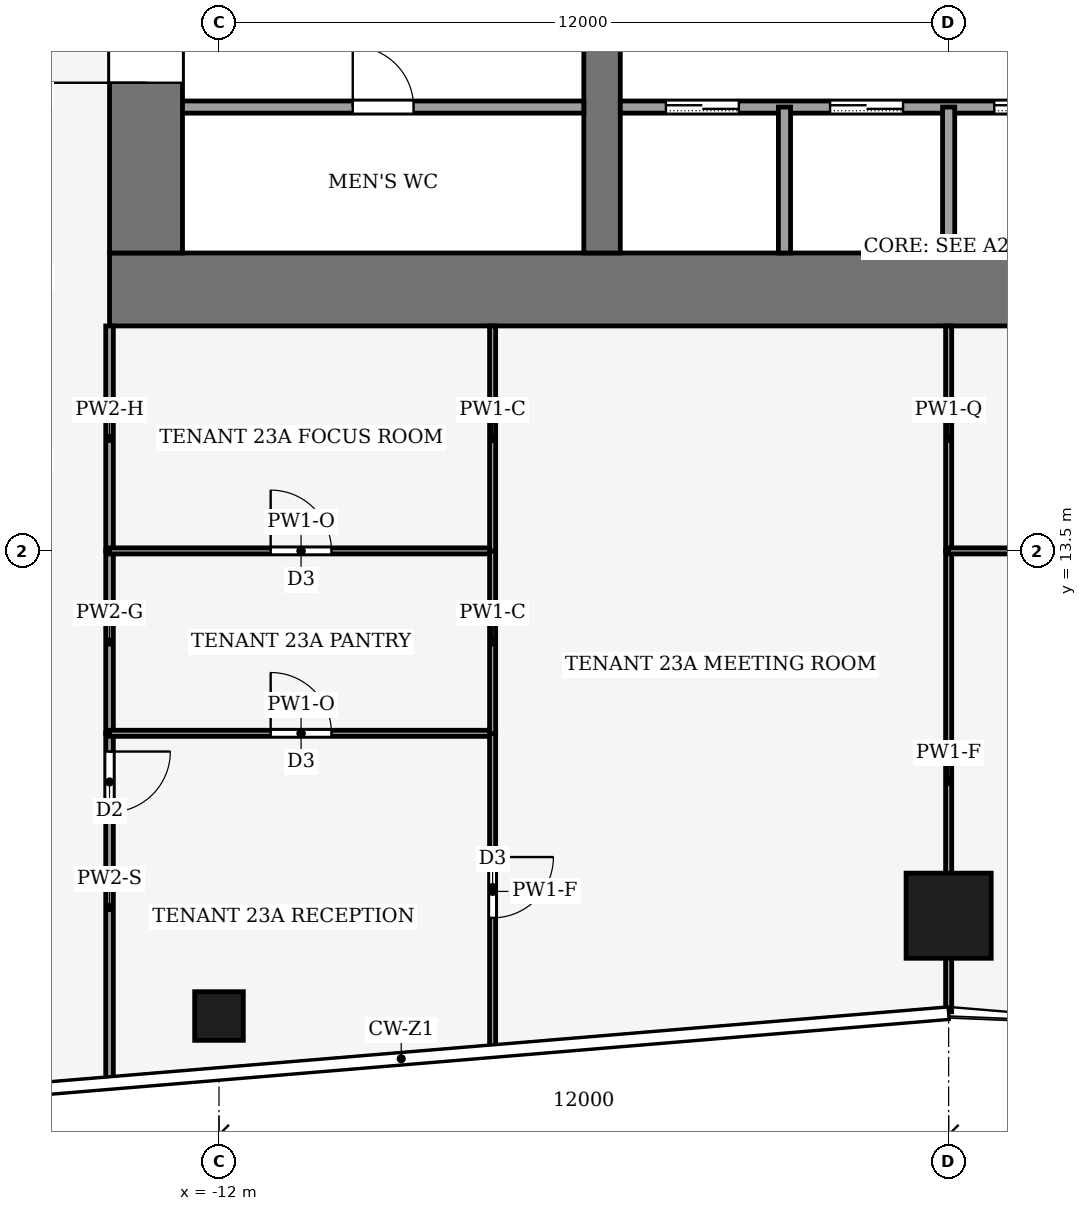
"""IFC4 building model, lengths in metres.
Left out: names, types, materials, properties, quantities, classifications, styles, units other than length and angle.
Written with IfcOpenShell. Run it as: python <this file> out.ifc"""

import sys

from ifc_helpers import new_model, si_unit, direction, frame, frame_2d, origin, origin_2d, place, context, subcontext, project, spatial, rectangle, hollow_rectangle, extrude, element, fill, save


model = new_model("IFC4")
c1 = context("Model", 3, precision=1e-05, world=origin(), true_north=direction((0.0, 1.0)))
c2 = subcontext(c1, "Body", "Model", "MODEL_VIEW")
j1 = project(units=[si_unit("LENGTHUNIT", "METRE"), si_unit("PLANEANGLEUNIT", "RADIAN")], contexts=[c1])
p1 = place(None, origin())
s1 = spatial("IfcSite", under=j1, at=p1, CompositionType="ELEMENT")
p2 = place(p1, origin())
s2 = spatial("IfcBuilding", under=s1, at=p2, CompositionType="ELEMENT")
p3 = place(p2, frame((0.0, 0.0, 102.0)))
s3 = spatial("IfcBuildingStorey", under=s2, at=p3, CompositionType="ELEMENT", Elevation=102.0)
p4 = place(p3, frame((-13.8, 17.8, -0.13), z_axis=(0.0, 0.0, 1.0), x_axis=(1.0, 0.0, 0.0)))
e1 = element("IfcWall", 1, at=p4, inside=s3, PredefinedType="SHEAR", context=c2, shape_type="SweptSolid", body=[
    extrude(rectangle(XDim=27.6, YDim=1.2, at=frame_2d((13.8, 0.0))), origin(), (0.0, 0.0, 1.0), 4.0),
])
p5 = place(p3, frame((-13.2, 18.4, -0.13), z_axis=(0.0, 0.0, 1.0), x_axis=(0.0, 1.0, 0.0)))
e2 = element("IfcWall", 2, at=p5, inside=s3, PredefinedType="SHEAR", context=c2, shape_type="SweptSolid", body=[
    extrude(rectangle(XDim=19.2, YDim=1.2, at=frame_2d((9.6, 0.0))), origin(), (0.0, 0.0, 1.0), 4.0),
])
p6 = place(p5, frame((2.8, 0.0, 0.13)))
e3 = element("IfcOpeningElement", 3, at=p6, cuts=e2, PredefinedType="OPENING", context=c2, shape_type="SweptSolid", body=[
    extrude(rectangle(XDim=2.4, YDim=2.4, at=frame_2d((1.2, 1.2))), frame((0.0, 0.61, 0.0), z_axis=(0.0, -1.0, 0.0), x_axis=(1.0, 0.0, 0.0)), (0.0, 0.0, 1.0), 1.22),
])
p7 = place(p5, frame((13.4, 0.0, 0.13)))
e4 = element("IfcOpeningElement", 4, at=p7, cuts=e2, PredefinedType="OPENING", context=c2, shape_type="SweptSolid", body=[
    extrude(rectangle(XDim=1.4, YDim=2.2, at=frame_2d((0.7, 1.1))), frame((0.0, 0.61, 0.0), z_axis=(0.0, -1.0, 0.0), x_axis=(1.0, 0.0, 0.0)), (0.0, 0.0, 1.0), 1.22),
])
p8 = place(p3, frame((-5.7, 18.4, -0.13), z_axis=(0.0, 0.0, 1.0), x_axis=(0.0, 1.0, 0.0)))
e5 = element("IfcWall", 5, at=p8, inside=s3, PredefinedType="SHEAR", context=c2, shape_type="SweptSolid", body=[
    extrude(rectangle(XDim=19.2, YDim=0.6, at=frame_2d((9.6, 0.0))), origin(), (0.0, 0.0, 1.0), 4.0),
])
p9 = place(p8, frame((8.35, 0.0, 0.13)))
e6 = element("IfcOpeningElement", 6, at=p9, cuts=e5, PredefinedType="OPENING", context=c2, shape_type="SweptSolid", body=[
    extrude(rectangle(XDim=0.9, YDim=2.1, at=frame_2d((0.45, 1.05))), frame((0.0, 0.31, 0.0), z_axis=(0.0, -1.0, 0.0), x_axis=(1.0, 0.0, 0.0)), (0.0, 0.0, 1.0), 0.62),
])
p10 = place(p3, frame((0.0, 7.5, 0.0), z_axis=(0.0, 0.0, 1.0), x_axis=(1.0, 0.0, 0.0)))
e7 = element("IfcColumn", 7, at=p10, inside=s3, PredefinedType="COLUMN", context=c2, shape_type="SweptSolid", body=[
    extrude(hollow_rectangle(XDim=1.4, YDim=1.4, WallThickness=0.08, at=origin_2d()), origin(), (0.0, 0.0, 1.0), 4.0),
])
p11 = place(p3, frame((-12.0, 5.85, 0.0), z_axis=(0.0, 0.0, 1.0), x_axis=(1.0, 0.0, 0.0)))
e8 = element("IfcColumn", 8, at=p11, inside=s3, PredefinedType="COLUMN", context=c2, shape_type="SweptSolid", body=[
    extrude(hollow_rectangle(XDim=0.8, YDim=0.8, WallThickness=0.04, at=origin_2d()), origin(), (0.0, 0.0, 1.0), 4.0),
])
p12 = place(p3, frame((-12.6, 20.8, 0.0), z_axis=(0.0, 0.0, 1.0), x_axis=(1.0, 0.0, 0.0)))
e9 = element("IfcWall", 9, at=p12, inside=s3, PredefinedType="PARTITIONING", context=c2, shape_type="SweptSolid", body=[
    extrude(rectangle(XDim=6.6, YDim=0.2, at=frame_2d((3.3, 0.0))), origin(), (0.0, 0.0, 1.0), 3.87),
])
p13 = place(p12, frame((2.8, 0.0, 0.0)))
e10 = element("IfcOpeningElement", 10, at=p13, cuts=e9, PredefinedType="OPENING", context=c2, shape_type="SweptSolid", body=[
    extrude(rectangle(XDim=1.0, YDim=2.1, at=frame_2d((0.5, 1.05))), frame((0.0, 0.11, 0.0), z_axis=(0.0, -1.0, 0.0), x_axis=(1.0, 0.0, 0.0)), (0.0, 0.0, 1.0), 0.22),
])
p14 = place(p3, frame((-5.4, 20.8, 0.0), z_axis=(0.0, 0.0, 1.0), x_axis=(1.0, 0.0, 0.0)))
e11 = element("IfcWall", 11, at=p14, inside=s3, PredefinedType="PARTITIONING", context=c2, shape_type="SweptSolid", body=[
    extrude(rectangle(XDim=10.8, YDim=0.2, at=frame_2d((5.4, 0.0))), origin(), (0.0, 0.0, 1.0), 3.87),
])
p15 = place(p14, frame((0.75, 0.0, 0.0)))
e12 = element("IfcOpeningElement", 12, at=p15, cuts=e11, PredefinedType="OPENING", context=c2, shape_type="SweptSolid", body=[
    extrude(rectangle(XDim=1.2, YDim=2.2, at=frame_2d((0.6, 1.1))), frame((0.0, 0.11, 0.0), z_axis=(0.0, -1.0, 0.0), x_axis=(1.0, 0.0, 0.0)), (0.0, 0.0, 1.0), 0.22),
])
p16 = place(p14, frame((3.45, 0.0, 0.0)))
e13 = element("IfcOpeningElement", 13, at=p16, cuts=e11, PredefinedType="OPENING", context=c2, shape_type="SweptSolid", body=[
    extrude(rectangle(XDim=1.2, YDim=2.2, at=frame_2d((0.6, 1.1))), frame((0.0, 0.11, 0.0), z_axis=(0.0, -1.0, 0.0), x_axis=(1.0, 0.0, 0.0)), (0.0, 0.0, 1.0), 0.22),
])
p17 = place(p14, frame((6.15, 0.0, 0.0)))
e14 = element("IfcOpeningElement", 14, at=p17, cuts=e11, PredefinedType="OPENING", context=c2, shape_type="SweptSolid", body=[
    extrude(rectangle(XDim=1.2, YDim=2.2, at=frame_2d((0.6, 1.1))), frame((0.0, 0.11, 0.0), z_axis=(0.0, -1.0, 0.0), x_axis=(1.0, 0.0, 0.0)), (0.0, 0.0, 1.0), 0.22),
])
p18 = place(p14, frame((8.85, 0.0, 0.0)))
e15 = element("IfcOpeningElement", 15, at=p18, cuts=e11, PredefinedType="OPENING", context=c2, shape_type="SweptSolid", body=[
    extrude(rectangle(XDim=1.2, YDim=2.2, at=frame_2d((0.6, 1.1))), frame((0.0, 0.11, 0.0), z_axis=(0.0, -1.0, 0.0), x_axis=(1.0, 0.0, 0.0)), (0.0, 0.0, 1.0), 0.22),
])
for number, where, z_axis, x_axis in (
    (16, (-2.7, 18.4, 0.0), (0.0, 0.0, 1.0), (0.0, 1.0, 0.0)),
    (17, (0.0, 18.4, 0.0), (0.0, 0.0, 1.0), (0.0, 1.0, 0.0)),
):
    element("IfcWall", number, at=place(p3, frame(where, z_axis=z_axis, x_axis=x_axis)), inside=s3, PredefinedType="PARTITIONING", context=c2, shape_type="SweptSolid", body=[
        extrude(rectangle(XDim=2.4, YDim=0.2, at=frame_2d((1.2, 0.0))), origin(), (0.0, 0.0, 1.0), 3.87),
    ])
p19 = place(p3, frame((-13.8, 10.5, 0.0), z_axis=(0.0, 0.0, 1.0), x_axis=(0.0, -1.0, 0.0)))
e18 = element("IfcWall", 18, at=p19, inside=s3, PredefinedType="PARTITIONING", context=c2, shape_type="SweptSolid", body=[
    extrude(rectangle(XDim=5.73, YDim=0.125, at=frame_2d((2.865, 0.0))), origin(), (0.0, 0.0, 1.0), 3.04),
])
p20 = place(p19, frame((0.3, 0.0, 0.0)))
e19 = element("IfcOpeningElement", 19, at=p20, cuts=e18, PredefinedType="OPENING", context=c2, shape_type="SweptSolid", body=[
    extrude(rectangle(XDim=1.0, YDim=2.1, at=frame_2d((0.5, 1.05))), frame((0.0, 0.073, 0.0), z_axis=(0.0, -1.0, 0.0), x_axis=(1.0, 0.0, 0.0)), (0.0, 0.0, 1.0), 0.145),
])
p21 = place(p3, frame((-13.8, 10.5, 0.0), z_axis=(0.0, 0.0, 1.0), x_axis=(0.0, 1.0, 0.0)))
e20 = element("IfcWall", 20, at=p21, inside=s3, PredefinedType="PARTITIONING", context=c2, shape_type="SweptSolid", body=[
    extrude(rectangle(XDim=3.0, YDim=0.125, at=frame_2d((1.5, 0.0))), origin(), (0.0, 0.0, 1.0), 3.87),
])
p22 = place(p3, frame((-13.8, 13.5, 0.0), z_axis=(0.0, 0.0, 1.0), x_axis=(0.0, 1.0, 0.0)))
e21 = element("IfcWall", 21, at=p22, inside=s3, PredefinedType="PARTITIONING", context=c2, shape_type="SweptSolid", body=[
    extrude(rectangle(XDim=3.7, YDim=0.125, at=frame_2d((1.85, 0.0))), origin(), (0.0, 0.0, 1.0), 3.14),
])
p23 = place(p3, frame((-13.8, 10.5, 0.0), z_axis=(0.0, 0.0, 1.0), x_axis=(1.0, 0.0, 0.0)))
e22 = element("IfcWall", 22, at=p23, inside=s3, PredefinedType="PARTITIONING", context=c2, shape_type="SweptSolid", body=[
    extrude(rectangle(XDim=6.3, YDim=0.1, at=frame_2d((3.15, 0.0))), origin(), (0.0, 0.0, 1.0), 3.39),
])
p24 = place(p23, frame((2.65, 0.0, 0.0)))
e23 = element("IfcOpeningElement", 23, at=p24, cuts=e22, PredefinedType="OPENING", context=c2, shape_type="SweptSolid", body=[
    extrude(rectangle(XDim=1.0, YDim=2.1, at=frame_2d((0.5, 1.05))), frame((0.0, 0.06, 0.0), z_axis=(0.0, -1.0, 0.0), x_axis=(1.0, 0.0, 0.0)), (0.0, 0.0, 1.0), 0.12),
])
p25 = place(p3, frame((-7.5, 10.504, 0.0), z_axis=(0.0, 0.0, 1.0), x_axis=(0.0, -1.0, 0.0)))
e24 = element("IfcWall", 24, at=p25, inside=s3, PredefinedType="PARTITIONING", context=c2, shape_type="SweptSolid", body=[
    extrude(rectangle(XDim=5.209, YDim=0.1, at=frame_2d((2.604, 0.0))), origin(), (0.0, 0.0, 1.0), 3.04),
])
p26 = place(p25, frame((2.039, 0.0, 0.0)))
e25 = element("IfcOpeningElement", 25, at=p26, cuts=e24, PredefinedType="OPENING", context=c2, shape_type="SweptSolid", body=[
    extrude(rectangle(XDim=1.0, YDim=2.1, at=frame_2d((0.5, 1.05))), frame((0.0, 0.06, 0.0), z_axis=(0.0, -1.0, 0.0), x_axis=(1.0, 0.0, 0.0)), (0.0, 0.0, 1.0), 0.12),
])
p27 = place(p3, frame((-13.8, 13.5, 0.0), z_axis=(0.0, 0.0, 1.0), x_axis=(1.0, 0.0, 0.0)))
e26 = element("IfcWall", 26, at=p27, inside=s3, PredefinedType="PARTITIONING", context=c2, shape_type="SweptSolid", body=[
    extrude(rectangle(XDim=6.3, YDim=0.1, at=frame_2d((3.15, 0.0))), origin(), (0.0, 0.0, 1.0), 3.39),
])
p28 = place(p27, frame((2.65, 0.0, 0.0)))
e27 = element("IfcOpeningElement", 27, at=p28, cuts=e26, PredefinedType="OPENING", context=c2, shape_type="SweptSolid", body=[
    extrude(rectangle(XDim=1.0, YDim=2.1, at=frame_2d((0.5, 1.05))), frame((0.0, 0.06, 0.0), z_axis=(0.0, -1.0, 0.0), x_axis=(1.0, 0.0, 0.0)), (0.0, 0.0, 1.0), 0.12),
])
p29 = place(p3, frame((-7.5, 10.496, 0.0), z_axis=(0.0, 0.0, 1.0), x_axis=(0.0, 1.0, 0.0)))
e28 = element("IfcWall", 28, at=p29, inside=s3, PredefinedType="PARTITIONING", context=c2, shape_type="SweptSolid", body=[
    extrude(rectangle(XDim=3.008, YDim=0.1, at=frame_2d((1.504, 0.0))), origin(), (0.0, 0.0, 1.0), 3.87),
])
p30 = place(p3, frame((-7.5, 13.496, 0.0), z_axis=(0.0, 0.0, 1.0), x_axis=(0.0, 1.0, 0.0)))
e29 = element("IfcWall", 29, at=p30, inside=s3, PredefinedType="PARTITIONING", context=c2, shape_type="SweptSolid", body=[
    extrude(rectangle(XDim=3.704, YDim=0.1, at=frame_2d((1.852, 0.0))), origin(), (0.0, 0.0, 1.0), 3.87),
])
p31 = place(p3, frame((0.0, 5.92, 0.0), z_axis=(0.0, 0.0, 1.0), x_axis=(0.0, 1.0, 0.0)))
e30 = element("IfcWall", 30, at=p31, inside=s3, PredefinedType="PARTITIONING", context=c2, shape_type="SweptSolid", body=[
    extrude(rectangle(XDim=7.58, YDim=0.1, at=frame_2d((3.79, 0.0))), origin(), (0.0, 0.0, 1.0), 3.04),
])
p32 = place(p3, frame((0.0, 13.5, 0.0), z_axis=(0.0, 0.0, 1.0), x_axis=(0.0, 1.0, 0.0)))
e31 = element("IfcWall", 31, at=p32, inside=s3, PredefinedType="PARTITIONING", context=c2, shape_type="SweptSolid", body=[
    extrude(rectangle(XDim=3.7, YDim=0.1, at=frame_2d((1.85, 0.0))), origin(), (0.0, 0.0, 1.0), 3.48),
])
p33 = place(p3, frame((0.0, 13.5, 0.0), z_axis=(0.0, 0.0, 1.0), x_axis=(1.0, 0.0, 0.0)))
e32 = element("IfcWall", 32, at=p33, inside=s3, PredefinedType="PARTITIONING", context=c2, shape_type="SweptSolid", body=[
    extrude(rectangle(XDim=7.5, YDim=0.1, at=frame_2d((3.75, 0.0))), origin(), (0.0, 0.0, 1.0), 3.44),
])
p34 = place(p33, frame((3.25, 0.0, 0.0)))
e33 = element("IfcOpeningElement", 33, at=p34, cuts=e32, PredefinedType="OPENING", context=c2, shape_type="SweptSolid", body=[
    extrude(rectangle(XDim=1.0, YDim=2.1, at=frame_2d((0.5, 1.05))), frame((0.0, 0.06, 0.0), z_axis=(0.0, -1.0, 0.0), x_axis=(1.0, 0.0, 0.0)), (0.0, 0.0, 1.0), 0.12),
])
p35 = place(p15, origin())
e34 = element("IfcDoor", 34, at=p35, inside=s3, OperationType="SLIDING_TO_LEFT", PredefinedType="DOOR", context=c2, shape_type="SweptSolid", body=[
    extrude(rectangle(XDim=1.2, YDim=2.2, at=frame_2d((0.6, 1.1))), frame((0.0, 0.025, 0.0), z_axis=(0.0, -1.0, 0.0), x_axis=(1.0, 0.0, 0.0)), (0.0, 0.0, 1.0), 0.05),
])
fill(e12, e34)
p36 = place(p16, origin())
e35 = element("IfcDoor", 35, at=p36, inside=s3, OperationType="SLIDING_TO_LEFT", PredefinedType="DOOR", context=c2, shape_type="SweptSolid", body=[
    extrude(rectangle(XDim=1.2, YDim=2.2, at=frame_2d((0.6, 1.1))), frame((0.0, 0.025, 0.0), z_axis=(0.0, -1.0, 0.0), x_axis=(1.0, 0.0, 0.0)), (0.0, 0.0, 1.0), 0.05),
])
fill(e13, e35)
p37 = place(p17, origin())
e36 = element("IfcDoor", 36, at=p37, inside=s3, OperationType="SLIDING_TO_LEFT", PredefinedType="DOOR", context=c2, shape_type="SweptSolid", body=[
    extrude(rectangle(XDim=1.2, YDim=2.2, at=frame_2d((0.6, 1.1))), frame((0.0, 0.025, 0.0), z_axis=(0.0, -1.0, 0.0), x_axis=(1.0, 0.0, 0.0)), (0.0, 0.0, 1.0), 0.05),
])
fill(e14, e36)
p38 = place(p13, origin())
e37 = element("IfcDoor", 37, at=p38, inside=s3, OperationType="SINGLE_SWING_LEFT", PredefinedType="DOOR", context=c2, shape_type="SweptSolid", body=[
    extrude(rectangle(XDim=1.0, YDim=2.1, at=frame_2d((0.5, 1.05))), frame((0.0, 0.025, 0.0), z_axis=(0.0, -1.0, 0.0), x_axis=(1.0, 0.0, 0.0)), (0.0, 0.0, 1.0), 0.05),
])
fill(e10, e37)
p39 = place(p6, origin())
e38 = element("IfcDoor", 38, at=p39, inside=s3, OperationType="DOUBLE_DOOR_SINGLE_SWING", PredefinedType="DOOR", context=c2, shape_type="SweptSolid", body=[
    extrude(rectangle(XDim=2.4, YDim=2.4, at=frame_2d((1.2, 1.2))), frame((0.0, 0.025, 0.0), z_axis=(0.0, -1.0, 0.0), x_axis=(1.0, 0.0, 0.0)), (0.0, 0.0, 1.0), 0.05),
])
fill(e3, e38)
p40 = place(p20, origin())
e39 = element("IfcDoor", 39, at=p40, inside=s3, OperationType="SINGLE_SWING_LEFT", PredefinedType="DOOR", context=c2, shape_type="SweptSolid", body=[
    extrude(rectangle(XDim=1.0, YDim=2.1, at=frame_2d((0.5, 1.05))), frame((0.0, 0.025, 0.0), z_axis=(0.0, -1.0, 0.0), x_axis=(1.0, 0.0, 0.0)), (0.0, 0.0, 1.0), 0.05),
])
fill(e19, e39)
p41 = place(p24, origin())
e40 = element("IfcDoor", 40, at=p41, inside=s3, OperationType="SINGLE_SWING_LEFT", PredefinedType="DOOR", context=c2, shape_type="SweptSolid", body=[
    extrude(rectangle(XDim=1.0, YDim=2.1, at=frame_2d((0.5, 1.05))), frame((0.0, 0.025, 0.0), z_axis=(0.0, -1.0, 0.0), x_axis=(1.0, 0.0, 0.0)), (0.0, 0.0, 1.0), 0.05),
])
fill(e23, e40)
p42 = place(p26, origin())
e41 = element("IfcDoor", 41, at=p42, inside=s3, OperationType="SINGLE_SWING_LEFT", PredefinedType="DOOR", context=c2, shape_type="SweptSolid", body=[
    extrude(rectangle(XDim=1.0, YDim=2.1, at=frame_2d((0.5, 1.05))), frame((0.0, 0.025, 0.0), z_axis=(0.0, -1.0, 0.0), x_axis=(1.0, 0.0, 0.0)), (0.0, 0.0, 1.0), 0.05),
])
fill(e25, e41)
p43 = place(p28, origin())
e42 = element("IfcDoor", 42, at=p43, inside=s3, OperationType="SINGLE_SWING_LEFT", PredefinedType="DOOR", context=c2, shape_type="SweptSolid", body=[
    extrude(rectangle(XDim=1.0, YDim=2.1, at=frame_2d((0.5, 1.05))), frame((0.0, 0.025, 0.0), z_axis=(0.0, -1.0, 0.0), x_axis=(1.0, 0.0, 0.0)), (0.0, 0.0, 1.0), 0.05),
])
fill(e27, e42)
save(model, sys.argv[1])
